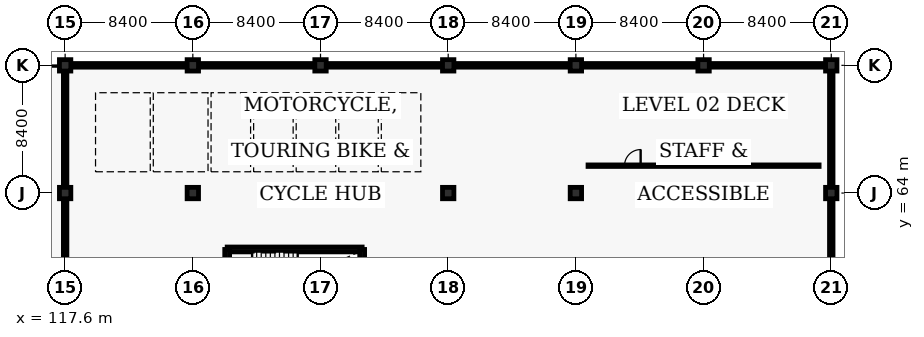
"""IFC4 building model, lengths in metres.
Left out: names, types, materials, properties, quantities, classifications, styles, units other than length and angle.
Written with IfcOpenShell. Run it as: python <this file> out.ifc"""

import sys

from ifc_helpers import new_model, si_unit, direction, frame, frame_2d, origin, origin_2d, place, context, subcontext, project, spatial, rectangle, extrude, element, fill, save


model = new_model("IFC4")
c1 = context("Model", 3, precision=1e-05, world=origin(), true_north=direction((0.0, 1.0)))
c2 = subcontext(c1, "Body", "Model", "MODEL_VIEW")
j1 = project(units=[si_unit("LENGTHUNIT", "METRE"), si_unit("PLANEANGLEUNIT", "RADIAN")], contexts=[c1])
p1 = place(None, origin())
s1 = spatial("IfcSite", under=j1, at=p1, CompositionType="ELEMENT")
p2 = place(p1, origin())
s2 = spatial("IfcBuilding", under=s1, at=p2, CompositionType="ELEMENT")
p3 = place(p2, frame((0.0, 0.0, 9.6)))
s3 = spatial("IfcBuildingStorey", under=s2, at=p3, CompositionType="ELEMENT", Elevation=9.6)
for number, where, z_axis, x_axis in (
    (1, (117.6, 64.0, 0.0), (0.0, 0.0, 1.0), (1.0, 0.0, 0.0)),
    (2, (117.6, 72.4, 0.0), (0.0, 0.0, 1.0), (1.0, 0.0, 0.0)),
    (3, (126.0, 64.0, 0.0), (0.0, 0.0, 1.0), (1.0, 0.0, 0.0)),
    (4, (126.0, 72.4, 0.0), (0.0, 0.0, 1.0), (1.0, 0.0, 0.0)),
    (5, (134.4, 64.0, 0.0), (0.0, 0.0, 1.0), (1.0, 0.0, 0.0)),
    (6, (134.4, 72.4, 0.0), (0.0, 0.0, 1.0), (1.0, 0.0, 0.0)),
    (7, (142.8, 64.0, 0.0), (0.0, 0.0, 1.0), (1.0, 0.0, 0.0)),
    (8, (142.8, 72.4, 0.0), (0.0, 0.0, 1.0), (1.0, 0.0, 0.0)),
    (9, (151.2, 64.0, 0.0), (0.0, 0.0, 1.0), (1.0, 0.0, 0.0)),
    (10, (151.2, 72.4, 0.0), (0.0, 0.0, 1.0), (1.0, 0.0, 0.0)),
    (11, (159.6, 64.0, 0.0), (0.0, 0.0, 1.0), (1.0, 0.0, 0.0)),
    (12, (159.6, 72.4, 0.0), (0.0, 0.0, 1.0), (1.0, 0.0, 0.0)),
    (13, (168.0, 64.0, 0.0), (0.0, 0.0, 1.0), (1.0, 0.0, 0.0)),
    (14, (168.0, 72.4, 0.0), (0.0, 0.0, 1.0), (1.0, 0.0, 0.0)),
):
    element("IfcColumn", number, at=place(p3, frame(where, z_axis=z_axis, x_axis=x_axis)), inside=s3, PredefinedType="COLUMN", context=c2, shape_type="SweptSolid", body=[
        extrude(rectangle(XDim=0.75, YDim=0.75, at=origin_2d()), origin(), (0.0, 0.0, 1.0), 3.52),
    ])
for number, where, z_axis, x_axis in (
    (15, (117.975, 72.4, 0.0), (0.0, 0.0, 1.0), (1.0, 0.0, 0.0)),
    (16, (126.375, 72.4, 0.0), (0.0, 0.0, 1.0), (1.0, 0.0, 0.0)),
):
    element("IfcWall", number, at=place(p3, frame(where, z_axis=z_axis, x_axis=x_axis)), inside=s3, PredefinedType="PARAPET", context=c2, shape_type="SweptSolid", body=[
        extrude(rectangle(XDim=7.65, YDim=0.23, at=frame_2d((3.825, 0.0))), origin(), (0.0, 0.0, 1.0), 1.15),
    ])
p4 = place(p3, frame((134.775, 72.4, 0.0), z_axis=(0.0, 0.0, 1.0), x_axis=(1.0, 0.0, 0.0)))
e17 = element("IfcWall", 17, at=p4, inside=s3, PredefinedType="PARAPET", context=c2, shape_type="SweptSolid", body=[
    extrude(rectangle(XDim=7.65, YDim=0.23, at=frame_2d((3.825, 0.0))), origin(), (0.0, 0.0, 1.0), 1.15),
])
p5 = place(p3, frame((143.175, 72.4, 0.0), z_axis=(0.0, 0.0, 1.0), x_axis=(1.0, 0.0, 0.0)))
e18 = element("IfcWall", 18, at=p5, inside=s3, PredefinedType="PARAPET", context=c2, shape_type="SweptSolid", body=[
    extrude(rectangle(XDim=7.65, YDim=0.23, at=frame_2d((3.825, 0.0))), origin(), (0.0, 0.0, 1.0), 1.15),
])
p6 = place(p3, frame((151.575, 72.4, 0.0), z_axis=(0.0, 0.0, 1.0), x_axis=(1.0, 0.0, 0.0)))
e19 = element("IfcWall", 19, at=p6, inside=s3, PredefinedType="PARAPET", context=c2, shape_type="SweptSolid", body=[
    extrude(rectangle(XDim=7.65, YDim=0.23, at=frame_2d((3.825, 0.0))), origin(), (0.0, 0.0, 1.0), 1.15),
])
for number, where, z_axis, x_axis in (
    (20, (159.975, 72.4, 0.0), (0.0, 0.0, 1.0), (1.0, 0.0, 0.0)),
    (21, (117.6, 55.975, 0.0), (0.0, 0.0, 1.0), (0.0, 1.0, 0.0)),
    (22, (168.0, 55.975, 0.0), (0.0, 0.0, 1.0), (0.0, 1.0, 0.0)),
    (23, (117.6, 64.375, 0.0), (0.0, 0.0, 1.0), (0.0, 1.0, 0.0)),
    (24, (168.0, 64.375, 0.0), (0.0, 0.0, 1.0), (0.0, 1.0, 0.0)),
):
    element("IfcWall", number, at=place(p3, frame(where, z_axis=z_axis, x_axis=x_axis)), inside=s3, PredefinedType="PARAPET", context=c2, shape_type="SweptSolid", body=[
        extrude(rectangle(XDim=7.65, YDim=0.23, at=frame_2d((3.825, 0.0))), origin(), (0.0, 0.0, 1.0), 1.15),
    ])
p7 = place(p3, frame((128.26, 60.29, 0.0), z_axis=(0.0, 0.0, 1.0), x_axis=(1.0, 0.0, 0.0)))
e25 = element("IfcWall", 25, at=p7, inside=s3, PredefinedType="SHEAR", context=c2, shape_type="SweptSolid", body=[
    extrude(rectangle(XDim=8.88, YDim=0.32, at=frame_2d((4.44, 0.0))), origin(), (0.0, 0.0, 1.0), 3.52),
])
p8 = place(p3, frame((128.26, 60.29, 0.0), z_axis=(0.0, 0.0, 1.0), x_axis=(0.0, -1.0, 0.0)))
e26 = element("IfcWall", 26, at=p8, inside=s3, PredefinedType="SHEAR", context=c2, shape_type="SweptSolid", body=[
    extrude(rectangle(XDim=3.43, YDim=0.32, at=frame_2d((1.715, 0.0))), origin(), (0.0, 0.0, 1.0), 3.52),
])
p9 = place(p8, frame((0.975, 0.0, 0.0)))
e27 = element("IfcOpeningElement", 27, at=p9, cuts=e26, PredefinedType="OPENING", context=c2, shape_type="SweptSolid", body=[
    extrude(rectangle(XDim=1.48, YDim=2.15, at=frame_2d((0.74, 1.075))), frame((0.0, 0.17, 0.0), z_axis=(0.0, -1.0, 0.0), x_axis=(1.0, 0.0, 0.0)), (0.0, 0.0, 1.0), 0.34),
])
p10 = place(p3, frame((137.14, 56.86, 0.0), z_axis=(0.0, 0.0, 1.0), x_axis=(0.0, 1.0, 0.0)))
e28 = element("IfcWall", 28, at=p10, inside=s3, PredefinedType="SHEAR", context=c2, shape_type="SweptSolid", body=[
    extrude(rectangle(XDim=3.43, YDim=0.32, at=frame_2d((1.715, 0.0))), origin(), (0.0, 0.0, 1.0), 3.52),
])
p11 = place(p3, frame((152.0, 65.8, 0.0), z_axis=(0.0, 0.0, 1.0), x_axis=(1.0, 0.0, 0.0)))
e29 = element("IfcWall", 29, at=p11, inside=s3, PredefinedType="PARTITIONING", context=c2, shape_type="SweptSolid", body=[
    extrude(rectangle(XDim=15.2, YDim=0.1, at=frame_2d((7.6, 0.0))), origin(), (0.0, 0.0, 1.0), 2.445),
])
p12 = place(p11, frame((2.4, 0.0, 0.0)))
e30 = element("IfcOpeningElement", 30, at=p12, cuts=e29, PredefinedType="OPENING", context=c2, shape_type="SweptSolid", body=[
    extrude(rectangle(XDim=1.06, YDim=2.1, at=frame_2d((0.53, 1.05))), frame((0.0, 0.06, 0.0), z_axis=(0.0, -1.0, 0.0), x_axis=(1.0, 0.0, 0.0)), (0.0, 0.0, 1.0), 0.12),
])
p13 = place(p12, origin())
e31 = element("IfcDoor", 31, at=p13, inside=s3, OperationType="SINGLE_SWING_RIGHT", PredefinedType="DOOR", context=c2, shape_type="SweptSolid", body=[
    extrude(rectangle(XDim=1.06, YDim=2.1, at=frame_2d((0.53, 1.05))), frame((0.0, 0.025, 0.0), z_axis=(0.0, -1.0, 0.0), x_axis=(1.0, 0.0, 0.0)), (0.0, 0.0, 1.0), 0.05),
])
fill(e30, e31)
save(model, sys.argv[1])
